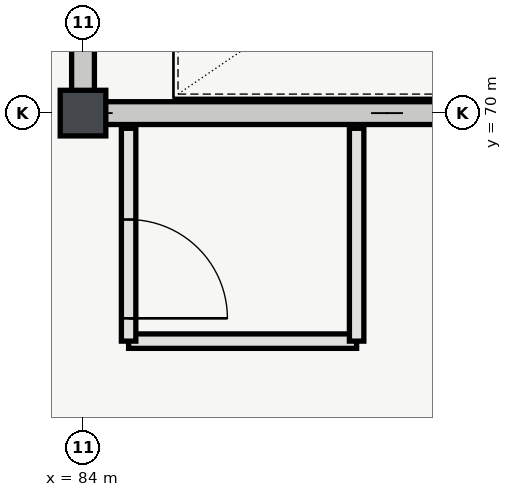
"""IFC4 building model, lengths in metres.
Left out: names, types, materials, properties, quantities, classifications, styles, units other than length and angle.
Written with IfcOpenShell. Run it as: python <this file> out.ifc"""

import sys

from ifc_helpers import new_model, si_unit, direction, frame, frame_2d, origin, origin_2d, place, context, subcontext, project, spatial, rectangle, extrude, element, fill, save


model = new_model("IFC4")
c1 = context("Model", 3, precision=1e-05, world=origin(), true_north=direction((0.0, 1.0)))
c2 = subcontext(c1, "Body", "Model", "MODEL_VIEW")
j1 = project(units=[si_unit("LENGTHUNIT", "METRE"), si_unit("PLANEANGLEUNIT", "RADIAN")], contexts=[c1])
p1 = place(None, origin())
s1 = spatial("IfcSite", under=j1, at=p1, CompositionType="ELEMENT")
p2 = place(p1, origin())
s2 = spatial("IfcBuilding", under=s1, at=p2, CompositionType="ELEMENT")
p3 = place(p2, frame((0.0, 0.0, 16.2)))
s3 = spatial("IfcBuildingStorey", under=s2, at=p3, CompositionType="ELEMENT", Elevation=16.2)
p4 = place(p3, frame((84.0, 70.0, 0.0), z_axis=(0.0, 0.0, 1.0), x_axis=(1.0, 0.0, 0.0)))
e1 = element("IfcColumn", 1, at=p4, inside=s3, PredefinedType="COLUMN", context=c2, shape_type="SweptSolid", body=[
    extrude(rectangle(XDim=0.6, YDim=0.6, at=origin_2d()), origin(), (0.0, 0.0, 1.0), 4.2),
])
p5 = place(p3, frame((83.85, 70.0, 0.0), z_axis=(0.0, 0.0, 1.0), x_axis=(1.0, 0.0, 0.0)))
e2 = element("IfcWall", 2, at=p5, inside=s3, PredefinedType="SHEAR", context=c2, shape_type="SweptSolid", body=[
    extrude(rectangle(XDim=8.3, YDim=0.3, at=frame_2d((4.15, 0.0))), origin(), (0.0, 0.0, 1.0), 3.92),
])
p6 = place(p3, frame((84.0, 70.15, 0.0), z_axis=(0.0, 0.0, 1.0), x_axis=(0.0, 1.0, 0.0)))
e3 = element("IfcWall", 3, at=p6, inside=s3, PredefinedType="SHEAR", context=c2, shape_type="SweptSolid", body=[
    extrude(rectangle(XDim=7.7, YDim=0.3, at=frame_2d((3.85, 0.0))), origin(), (0.0, 0.0, 1.0), 3.92),
])
p7 = place(p6, frame((1.65, 0.0, 0.0)))
e4 = element("IfcOpeningElement", 4, at=p7, cuts=e3, PredefinedType="OPENING", context=c2, shape_type="SweptSolid", body=[
    extrude(rectangle(XDim=1.4, YDim=2.2, at=frame_2d((0.7, 1.1))), frame((0.0, 0.16, 0.0), z_axis=(0.0, -1.0, 0.0), x_axis=(1.0, 0.0, 0.0)), (0.0, 0.0, 1.0), 0.32),
])
p8 = place(p3, frame((84.6, 67.0, 0.0), z_axis=(0.0, 0.0, 1.0), x_axis=(1.0, 0.0, 0.0)))
e5 = element("IfcWall", 5, at=p8, inside=s3, PredefinedType="PARTITIONING", context=c2, shape_type="SweptSolid", body=[
    extrude(rectangle(XDim=3.0, YDim=0.19, at=frame_2d((1.5, 0.0))), origin(), (0.0, 0.0, 1.0), 3.92),
])
p9 = place(p3, frame((84.6, 69.8, 0.0), z_axis=(0.0, 0.0, 1.0), x_axis=(0.0, -1.0, 0.0)))
e6 = element("IfcWall", 6, at=p9, inside=s3, PredefinedType="PARTITIONING", context=c2, shape_type="SweptSolid", body=[
    extrude(rectangle(XDim=2.8, YDim=0.19, at=frame_2d((1.4, 0.0))), origin(), (0.0, 0.0, 1.0), 3.92),
])
p10 = place(p9, frame((1.2, 0.0, 0.0)))
e7 = element("IfcOpeningElement", 7, at=p10, cuts=e6, PredefinedType="OPENING", context=c2, shape_type="SweptSolid", body=[
    extrude(rectangle(XDim=1.3, YDim=2.2, at=frame_2d((0.65, 1.1))), frame((0.0, 0.105, 0.0), z_axis=(0.0, -1.0, 0.0), x_axis=(1.0, 0.0, 0.0)), (0.0, 0.0, 1.0), 0.21),
])
p11 = place(p3, frame((87.6, 67.0, 0.0), z_axis=(0.0, 0.0, 1.0), x_axis=(0.0, 1.0, 0.0)))
e8 = element("IfcWall", 8, at=p11, inside=s3, PredefinedType="PARTITIONING", context=c2, shape_type="SweptSolid", body=[
    extrude(rectangle(XDim=2.8, YDim=0.19, at=frame_2d((1.4, 0.0))), origin(), (0.0, 0.0, 1.0), 3.92),
])
p12 = place(p10, origin())
e9 = element("IfcDoor", 9, at=p12, inside=s3, OperationType="SINGLE_SWING_RIGHT", PredefinedType="DOOR", context=c2, shape_type="SweptSolid", body=[
    extrude(rectangle(XDim=1.3, YDim=2.2, at=frame_2d((0.65, 1.1))), frame((0.0, 0.025, 0.0), z_axis=(0.0, -1.0, 0.0), x_axis=(1.0, 0.0, 0.0)), (0.0, 0.0, 1.0), 0.05),
])
fill(e7, e9)
save(model, sys.argv[1])
